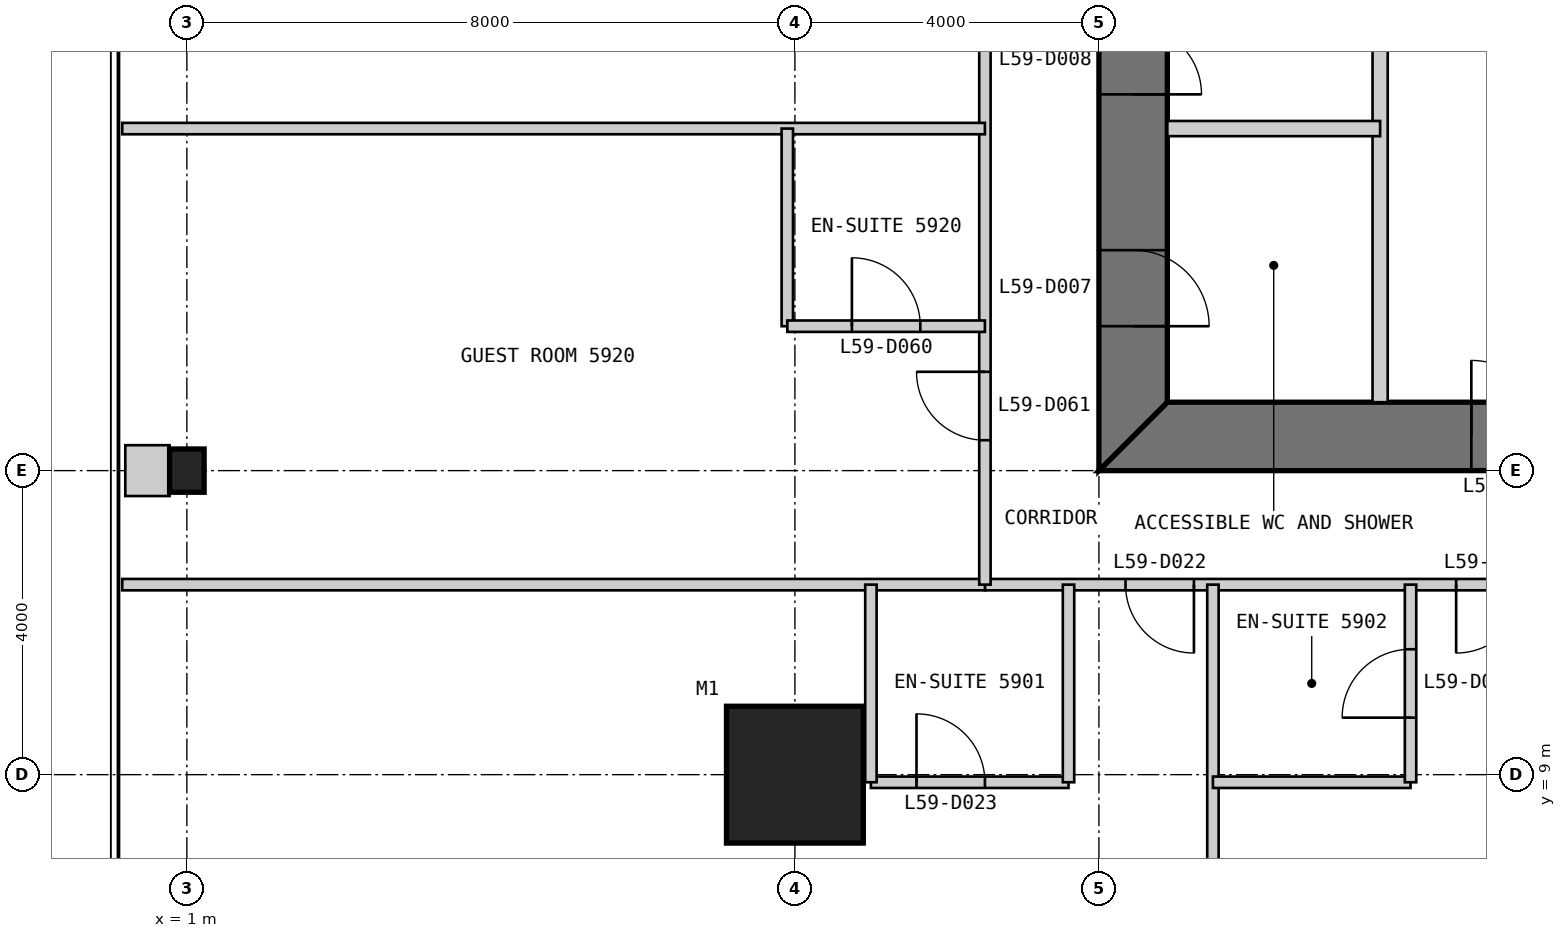
"""IFC4 building model, lengths in metres.
Left out: names, types, materials, properties, quantities, classifications, styles, units other than length and angle.
Written with IfcOpenShell. Run it as: python <this file> out.ifc"""

import sys

from ifc_helpers import new_model, si_unit, direction, frame, frame_2d, origin, origin_2d, place, context, subcontext, project, spatial, polyline, rectangle, i_section, outline, extrude, element, fill, save


model = new_model("IFC4")
c1 = context("Model", 3, precision=1e-05, world=origin(), true_north=direction((0.0, 1.0)))
c2 = subcontext(c1, "Body", "Model", "MODEL_VIEW")
j1 = project(units=[si_unit("LENGTHUNIT", "METRE"), si_unit("PLANEANGLEUNIT", "RADIAN")], contexts=[c1])
p1 = place(None, origin())
s1 = spatial("IfcSite", under=j1, at=p1, CompositionType="ELEMENT")
p2 = place(p1, origin())
s2 = spatial("IfcBuilding", under=s1, at=p2, CompositionType="ELEMENT")
p3 = place(p2, frame((0.0, 0.0, 252.6)))
s3 = spatial("IfcBuildingStorey", under=s2, at=p3, CompositionType="ELEMENT", Elevation=252.6)
p4 = place(p3, frame((9.0, 9.0, 0.0), z_axis=(0.0, 0.0, 1.0), x_axis=(1.0, 0.0, 0.0)))
e1 = element("IfcColumn", 1, at=p4, inside=s3, PredefinedType="COLUMN", context=c2, shape_type="SweptSolid", body=[
    extrude(rectangle(XDim=1.8, YDim=1.8, at=origin_2d()), origin(), (0.0, 0.0, 1.0), 3.4),
])
p5 = place(p3, frame((1.0, 13.0, 0.0), z_axis=(0.0, 0.0, 1.0), x_axis=(1.0, 0.0, 0.0)))
e2 = element("IfcColumn", 2, at=p5, inside=s3, PredefinedType="COLUMN", context=c2, shape_type="SweptSolid", body=[
    extrude(i_section(OverallWidth=0.455, OverallDepth=0.569, WebThickness=0.078, FlangeThickness=0.125, at=origin_2d()), origin(), (0.0, 0.0, 1.0), 3.4),
])
p6 = place(p3, frame((13.0, 13.45, 0.0), z_axis=(0.0, 0.0, 1.0), x_axis=(1.0, 0.0, 0.0)))
e3 = element("IfcWall", 3, at=p6, inside=s3, PredefinedType="SHEAR", context=c2, shape_type="SweptSolid", body=[
    extrude(outline(polyline([(0.0, -0.45), (24.0, -0.45), (23.1, 0.45), (0.9, 0.45), (0.0, -0.45)])), origin(), (0.0, 0.0, 1.0), 3.4),
])
p7 = place(p6, frame((4.9, 0.0, 0.0)))
e4 = element("IfcOpeningElement", 4, at=p7, cuts=e3, PredefinedType="OPENING", context=c2, shape_type="SweptSolid", body=[
    extrude(rectangle(XDim=1.0, YDim=2.2, at=frame_2d((0.5, 1.1))), frame((0.0, 0.46, 0.0), z_axis=(0.0, -1.0, 0.0), x_axis=(1.0, 0.0, 0.0)), (0.0, 0.0, 1.0), 0.92),
])
p8 = place(p6, frame((8.9, 0.0, 0.0)))
e5 = element("IfcOpeningElement", 5, at=p8, cuts=e3, PredefinedType="OPENING", context=c2, shape_type="SweptSolid", body=[
    extrude(rectangle(XDim=1.1, YDim=2.2, at=frame_2d((0.55, 1.1))), frame((0.0, 0.46, 0.0), z_axis=(0.0, -1.0, 0.0), x_axis=(1.0, 0.0, 0.0)), (0.0, 0.0, 1.0), 0.92),
])
p9 = place(p6, frame((15.05, 0.0, 0.0)))
e6 = element("IfcOpeningElement", 6, at=p9, cuts=e3, PredefinedType="OPENING", context=c2, shape_type="SweptSolid", body=[
    extrude(rectangle(XDim=0.9, YDim=2.2, at=frame_2d((0.45, 1.1))), frame((0.0, 0.46, 0.0), z_axis=(0.0, -1.0, 0.0), x_axis=(1.0, 0.0, 0.0)), (0.0, 0.0, 1.0), 0.92),
])
p10 = place(p6, frame((17.9, 0.0, 0.0)))
e7 = element("IfcOpeningElement", 7, at=p10, cuts=e3, PredefinedType="OPENING", context=c2, shape_type="SweptSolid", body=[
    extrude(rectangle(XDim=1.0, YDim=2.2, at=frame_2d((0.5, 1.1))), frame((0.0, 0.46, 0.0), z_axis=(0.0, -1.0, 0.0), x_axis=(1.0, 0.0, 0.0)), (0.0, 0.0, 1.0), 0.92),
])
p11 = place(p6, frame((21.4, 0.0, 0.0)))
e8 = element("IfcOpeningElement", 8, at=p11, cuts=e3, PredefinedType="OPENING", context=c2, shape_type="SweptSolid", body=[
    extrude(rectangle(XDim=1.0, YDim=2.2, at=frame_2d((0.5, 1.1))), frame((0.0, 0.46, 0.0), z_axis=(0.0, -1.0, 0.0), x_axis=(1.0, 0.0, 0.0)), (0.0, 0.0, 1.0), 0.92),
])
p12 = place(p3, frame((13.45, 36.1, 0.0), z_axis=(0.0, 0.0, 1.0), x_axis=(0.0, -1.0, 0.0)))
e9 = element("IfcWall", 9, at=p12, inside=s3, PredefinedType="SHEAR", context=c2, shape_type="SweptSolid", body=[
    extrude(outline(polyline([(-0.9, -0.45), (23.1, -0.45), (22.2, 0.45), (0.0, 0.45), (-0.9, -0.45)])), origin(), (0.0, 0.0, 1.0), 3.4),
])
p13 = place(p12, frame((20.2, 0.0, 0.0)))
e10 = element("IfcOpeningElement", 10, at=p13, cuts=e9, PredefinedType="OPENING", context=c2, shape_type="SweptSolid", body=[
    extrude(rectangle(XDim=1.0, YDim=2.2, at=frame_2d((0.5, 1.1))), frame((0.0, 0.46, 0.0), z_axis=(0.0, -1.0, 0.0), x_axis=(1.0, 0.0, 0.0)), (0.0, 0.0, 1.0), 0.92),
])
p14 = place(p12, frame((17.25, 0.0, 0.0)))
e11 = element("IfcOpeningElement", 11, at=p14, cuts=e9, PredefinedType="OPENING", context=c2, shape_type="SweptSolid", body=[
    extrude(rectangle(XDim=0.9, YDim=2.2, at=frame_2d((0.45, 1.1))), frame((0.0, 0.46, 0.0), z_axis=(0.0, -1.0, 0.0), x_axis=(1.0, 0.0, 0.0)), (0.0, 0.0, 1.0), 0.92),
])
p15 = place(p3, frame((16.7, 13.9, 0.0), z_axis=(0.0, 0.0, 1.0), x_axis=(0.0, 1.0, 0.0)))
e12 = element("IfcWall", 12, at=p15, inside=s3, PredefinedType="PARTITIONING", context=c2, shape_type="SweptSolid", body=[
    extrude(rectangle(XDim=16.1, YDim=0.2, at=frame_2d((8.05, 0.0))), origin(), (0.0, 0.0, 1.0), 3.2),
])
p16 = place(p15, frame((13.4, 0.0, 0.0)))
e13 = element("IfcOpeningElement", 13, at=p16, cuts=e12, PredefinedType="OPENING", context=c2, shape_type="SweptSolid", body=[
    extrude(rectangle(XDim=0.9, YDim=2.2, at=frame_2d((0.45, 1.1))), frame((0.0, 0.11, 0.0), z_axis=(0.0, -1.0, 0.0), x_axis=(1.0, 0.0, 0.0)), (0.0, 0.0, 1.0), 0.22),
])
p17 = place(p3, frame((13.9, 17.5, 0.0), z_axis=(0.0, 0.0, 1.0), x_axis=(1.0, 0.0, 0.0)))
e14 = element("IfcWall", 14, at=p17, inside=s3, PredefinedType="PARTITIONING", context=c2, shape_type="SweptSolid", body=[
    extrude(rectangle(XDim=2.8, YDim=0.2, at=frame_2d((1.4, 0.0))), origin(), (0.0, 0.0, 1.0), 3.2),
])
p18 = place(p3, frame((11.5, 11.5, 0.0), z_axis=(0.0, 0.0, 1.0), x_axis=(1.0, 0.0, 0.0)))
e15 = element("IfcWall", 15, at=p18, inside=s3, PredefinedType="PARTITIONING", context=c2, shape_type="SweptSolid", body=[
    extrude(rectangle(XDim=27.0, YDim=0.15, at=frame_2d((13.5, 0.0))), origin(), (0.0, 0.0, 1.0), 3.25),
])
p19 = place(p18, frame((1.85, 0.0, 0.0)))
e16 = element("IfcOpeningElement", 16, at=p19, cuts=e15, PredefinedType="OPENING", context=c2, shape_type="SweptSolid", body=[
    extrude(rectangle(XDim=0.9, YDim=2.1, at=frame_2d((0.45, 1.05))), frame((0.0, 0.085, 0.0), z_axis=(0.0, -1.0, 0.0), x_axis=(1.0, 0.0, 0.0)), (0.0, 0.0, 1.0), 0.17),
])
p20 = place(p18, frame((6.2, 0.0, 0.0)))
e17 = element("IfcOpeningElement", 17, at=p20, cuts=e15, PredefinedType="OPENING", context=c2, shape_type="SweptSolid", body=[
    extrude(rectangle(XDim=0.9, YDim=2.1, at=frame_2d((0.45, 1.05))), frame((0.0, 0.085, 0.0), z_axis=(0.0, -1.0, 0.0), x_axis=(1.0, 0.0, 0.0)), (0.0, 0.0, 1.0), 0.17),
])
p21 = place(p18, frame((12.2, 0.0, 0.0)))
e18 = element("IfcOpeningElement", 18, at=p21, cuts=e15, PredefinedType="OPENING", context=c2, shape_type="SweptSolid", body=[
    extrude(rectangle(XDim=0.9, YDim=2.1, at=frame_2d((0.45, 1.05))), frame((0.0, 0.085, 0.0), z_axis=(0.0, -1.0, 0.0), x_axis=(1.0, 0.0, 0.0)), (0.0, 0.0, 1.0), 0.17),
])
p22 = place(p18, frame((18.8, 0.0, 0.0)))
e19 = element("IfcOpeningElement", 19, at=p22, cuts=e15, PredefinedType="OPENING", context=c2, shape_type="SweptSolid", body=[
    extrude(rectangle(XDim=1.0, YDim=2.1, at=frame_2d((0.5, 1.05))), frame((0.0, 0.085, 0.0), z_axis=(0.0, -1.0, 0.0), x_axis=(1.0, 0.0, 0.0)), (0.0, 0.0, 1.0), 0.17),
])
p23 = place(p18, frame((24.2, 0.0, 0.0)))
e20 = element("IfcOpeningElement", 20, at=p23, cuts=e15, PredefinedType="OPENING", context=c2, shape_type="SweptSolid", body=[
    extrude(rectangle(XDim=0.9, YDim=2.1, at=frame_2d((0.45, 1.05))), frame((0.0, 0.085, 0.0), z_axis=(0.0, -1.0, 0.0), x_axis=(1.0, 0.0, 0.0)), (0.0, 0.0, 1.0), 0.17),
])
p24 = place(p3, frame((0.15, 11.5, 0.0), z_axis=(0.0, 0.0, 1.0), x_axis=(1.0, 0.0, 0.0)))
e21 = element("IfcWall", 21, at=p24, inside=s3, PredefinedType="PARTITIONING", context=c2, shape_type="SweptSolid", body=[
    extrude(rectangle(XDim=11.35, YDim=0.15, at=frame_2d((5.675, 0.0))), origin(), (0.0, 0.0, 1.0), 3.25),
])
p25 = place(p3, frame((10.0, 8.9, 0.0), z_axis=(0.0, 0.0, 1.0), x_axis=(1.0, 0.0, 0.0)))
e22 = element("IfcWall", 22, at=p25, inside=s3, PredefinedType="PARTITIONING", context=c2, shape_type="SweptSolid", body=[
    extrude(rectangle(XDim=2.6, YDim=0.15, at=frame_2d((1.3, 0.0))), origin(), (0.0, 0.0, 1.0), 2.638),
])
p26 = place(p25, frame((0.6, 0.0, 0.0)))
e23 = element("IfcOpeningElement", 23, at=p26, cuts=e22, PredefinedType="OPENING", context=c2, shape_type="SweptSolid", body=[
    extrude(rectangle(XDim=0.9, YDim=2.1, at=frame_2d((0.45, 1.05))), frame((0.0, 0.085, 0.0), z_axis=(0.0, -1.0, 0.0), x_axis=(1.0, 0.0, 0.0)), (0.0, 0.0, 1.0), 0.17),
])
for number, where, z_axis, x_axis in (
    (24, (10.0, 8.9, 0.0), (0.0, 0.0, 1.0), (0.0, 1.0, 0.0)),
    (25, (12.6, 8.9, 0.0), (0.0, 0.0, 1.0), (0.0, 1.0, 0.0)),
):
    element("IfcWall", number, at=place(p3, frame(where, z_axis=z_axis, x_axis=x_axis)), inside=s3, PredefinedType="PARTITIONING", context=c2, shape_type="SweptSolid", body=[
        extrude(rectangle(XDim=2.6, YDim=0.15, at=frame_2d((1.3, 0.0))), origin(), (0.0, 0.0, 1.0), 3.25),
    ])
p27 = place(p3, frame((14.5, 0.15, 0.0), z_axis=(0.0, 0.0, 1.0), x_axis=(0.0, 1.0, 0.0)))
e26 = element("IfcWall", 26, at=p27, inside=s3, PredefinedType="PARTITIONING", context=c2, shape_type="SweptSolid", body=[
    extrude(rectangle(XDim=11.35, YDim=0.15, at=frame_2d((5.675, 0.0))), origin(), (0.0, 0.0, 1.0), 3.25),
])
p28 = place(p3, frame((14.5, 8.9, 0.0), z_axis=(0.0, 0.0, 1.0), x_axis=(1.0, 0.0, 0.0)))
e27 = element("IfcWall", 27, at=p28, inside=s3, PredefinedType="PARTITIONING", context=c2, shape_type="SweptSolid", body=[
    extrude(rectangle(XDim=2.6, YDim=0.15, at=frame_2d((1.3, 0.0))), origin(), (0.0, 0.0, 1.0), 3.25),
])
p29 = place(p3, frame((17.1, 8.9, 0.0), z_axis=(0.0, 0.0, 1.0), x_axis=(0.0, 1.0, 0.0)))
e28 = element("IfcWall", 28, at=p29, inside=s3, PredefinedType="PARTITIONING", context=c2, shape_type="SweptSolid", body=[
    extrude(rectangle(XDim=2.6, YDim=0.15, at=frame_2d((1.3, 0.0))), origin(), (0.0, 0.0, 1.0), 3.25),
])
p30 = place(p29, frame((0.85, 0.0, 0.0)))
e29 = element("IfcOpeningElement", 29, at=p30, cuts=e28, PredefinedType="OPENING", context=c2, shape_type="SweptSolid", body=[
    extrude(rectangle(XDim=0.9, YDim=2.1, at=frame_2d((0.45, 1.05))), frame((0.0, 0.085, 0.0), z_axis=(0.0, -1.0, 0.0), x_axis=(1.0, 0.0, 0.0)), (0.0, 0.0, 1.0), 0.17),
])
p31 = place(p3, frame((11.5, 38.5, 0.0), z_axis=(0.0, 0.0, 1.0), x_axis=(0.0, -1.0, 0.0)))
e30 = element("IfcWall", 30, at=p31, inside=s3, PredefinedType="PARTITIONING", context=c2, shape_type="SweptSolid", body=[
    extrude(rectangle(XDim=27.0, YDim=0.15, at=frame_2d((13.5, 0.0))), origin(), (0.0, 0.0, 1.0), 3.25),
])
p32 = place(p31, frame((1.85, 0.0, 0.0)))
e31 = element("IfcOpeningElement", 31, at=p32, cuts=e30, PredefinedType="OPENING", context=c2, shape_type="SweptSolid", body=[
    extrude(rectangle(XDim=0.9, YDim=2.1, at=frame_2d((0.45, 1.05))), frame((0.0, 0.085, 0.0), z_axis=(0.0, -1.0, 0.0), x_axis=(1.0, 0.0, 0.0)), (0.0, 0.0, 1.0), 0.17),
])
p33 = place(p31, frame((6.2, 0.0, 0.0)))
e32 = element("IfcOpeningElement", 32, at=p33, cuts=e30, PredefinedType="OPENING", context=c2, shape_type="SweptSolid", body=[
    extrude(rectangle(XDim=0.9, YDim=2.1, at=frame_2d((0.45, 1.05))), frame((0.0, 0.085, 0.0), z_axis=(0.0, -1.0, 0.0), x_axis=(1.0, 0.0, 0.0)), (0.0, 0.0, 1.0), 0.17),
])
p34 = place(p31, frame((12.2, 0.0, 0.0)))
e33 = element("IfcOpeningElement", 33, at=p34, cuts=e30, PredefinedType="OPENING", context=c2, shape_type="SweptSolid", body=[
    extrude(rectangle(XDim=0.9, YDim=2.1, at=frame_2d((0.45, 1.05))), frame((0.0, 0.085, 0.0), z_axis=(0.0, -1.0, 0.0), x_axis=(1.0, 0.0, 0.0)), (0.0, 0.0, 1.0), 0.17),
])
p35 = place(p31, frame((18.2, 0.0, 0.0)))
e34 = element("IfcOpeningElement", 34, at=p35, cuts=e30, PredefinedType="OPENING", context=c2, shape_type="SweptSolid", body=[
    extrude(rectangle(XDim=0.9, YDim=2.1, at=frame_2d((0.45, 1.05))), frame((0.0, 0.085, 0.0), z_axis=(0.0, -1.0, 0.0), x_axis=(1.0, 0.0, 0.0)), (0.0, 0.0, 1.0), 0.17),
])
p36 = place(p31, frame((24.2, 0.0, 0.0)))
e35 = element("IfcOpeningElement", 35, at=p36, cuts=e30, PredefinedType="OPENING", context=c2, shape_type="SweptSolid", body=[
    extrude(rectangle(XDim=0.9, YDim=2.1, at=frame_2d((0.45, 1.05))), frame((0.0, 0.085, 0.0), z_axis=(0.0, -1.0, 0.0), x_axis=(1.0, 0.0, 0.0)), (0.0, 0.0, 1.0), 0.17),
])
p37 = place(p3, frame((0.15, 17.5, 0.0), z_axis=(0.0, 0.0, 1.0), x_axis=(1.0, 0.0, 0.0)))
e36 = element("IfcWall", 36, at=p37, inside=s3, PredefinedType="PARTITIONING", context=c2, shape_type="SweptSolid", body=[
    extrude(rectangle(XDim=11.35, YDim=0.15, at=frame_2d((5.675, 0.0))), origin(), (0.0, 0.0, 1.0), 3.25),
])
p38 = place(p3, frame((8.9, 17.5, 0.0), z_axis=(0.0, 0.0, 1.0), x_axis=(0.0, -1.0, 0.0)))
e37 = element("IfcWall", 37, at=p38, inside=s3, PredefinedType="PARTITIONING", context=c2, shape_type="SweptSolid", body=[
    extrude(rectangle(XDim=2.6, YDim=0.15, at=frame_2d((1.3, 0.0))), origin(), (0.0, 0.0, 1.0), 3.25),
])
p39 = place(p3, frame((8.9, 14.9, 0.0), z_axis=(0.0, 0.0, 1.0), x_axis=(1.0, 0.0, 0.0)))
e38 = element("IfcWall", 38, at=p39, inside=s3, PredefinedType="PARTITIONING", context=c2, shape_type="SweptSolid", body=[
    extrude(rectangle(XDim=2.6, YDim=0.15, at=frame_2d((1.3, 0.0))), origin(), (0.0, 0.0, 1.0), 3.25),
])
p40 = place(p39, frame((0.85, 0.0, 0.0)))
e39 = element("IfcOpeningElement", 39, at=p40, cuts=e38, PredefinedType="OPENING", context=c2, shape_type="SweptSolid", body=[
    extrude(rectangle(XDim=0.9, YDim=2.1, at=frame_2d((0.45, 1.05))), frame((0.0, 0.085, 0.0), z_axis=(0.0, -1.0, 0.0), x_axis=(1.0, 0.0, 0.0)), (0.0, 0.0, 1.0), 0.17),
])
p41 = place(p3, frame((0.19, 13.0, 0.0), z_axis=(0.0, 0.0, 1.0), x_axis=(1.0, 0.0, 0.0)))
e40 = element("IfcWall", 40, at=p41, inside=s3, PredefinedType="PARTITIONING", context=c2, shape_type="SweptSolid", body=[
    extrude(rectangle(XDim=0.583, YDim=0.669, at=frame_2d((0.292, 0.0))), origin(), (0.0, 0.0, 1.0), 3.25),
])
p42 = place(p7, origin())
e41 = element("IfcDoor", 41, at=p42, inside=s3, OperationType="SINGLE_SWING_LEFT", PredefinedType="DOOR", context=c2, shape_type="SweptSolid", body=[
    extrude(rectangle(XDim=1.0, YDim=2.2, at=frame_2d((0.5, 1.1))), frame((0.0, 0.025, 0.0), z_axis=(0.0, -1.0, 0.0), x_axis=(1.0, 0.0, 0.0)), (0.0, 0.0, 1.0), 0.05),
    extrude(outline(polyline([(0.0, 0.0), (0.04, 0.0), (0.04, 2.16), (0.96, 2.16), (0.96, 0.0), (1.0, 0.0), (1.0, 2.2), (0.0, 2.2), (0.0, 0.0)])), frame((0.0, 0.3, 0.0), z_axis=(0.0, -1.0, 0.0), x_axis=(1.0, 0.0, 0.0)), (0.0, 0.0, 1.0), 0.6),
])
fill(e4, e41)
p43 = place(p13, origin())
e42 = element("IfcDoor", 42, at=p43, inside=s3, OperationType="SINGLE_SWING_RIGHT", PredefinedType="DOOR", context=c2, shape_type="SweptSolid", body=[
    extrude(rectangle(XDim=1.0, YDim=2.2, at=frame_2d((0.5, 1.1))), frame((0.0, 0.025, 0.0), z_axis=(0.0, -1.0, 0.0), x_axis=(1.0, 0.0, 0.0)), (0.0, 0.0, 1.0), 0.05),
    extrude(outline(polyline([(0.0, 0.0), (0.04, 0.0), (0.04, 2.16), (0.96, 2.16), (0.96, 0.0), (1.0, 0.0), (1.0, 2.2), (0.0, 2.2), (0.0, 0.0)])), frame((0.0, 0.3, 0.0), z_axis=(0.0, -1.0, 0.0), x_axis=(1.0, 0.0, 0.0)), (0.0, 0.0, 1.0), 0.6),
])
fill(e10, e42)
p44 = place(p14, origin())
e43 = element("IfcDoor", 43, at=p44, inside=s3, OperationType="SINGLE_SWING_RIGHT", PredefinedType="DOOR", context=c2, shape_type="SweptSolid", body=[
    extrude(rectangle(XDim=0.9, YDim=2.2, at=frame_2d((0.45, 1.1))), frame((0.0, 0.025, 0.0), z_axis=(0.0, -1.0, 0.0), x_axis=(1.0, 0.0, 0.0)), (0.0, 0.0, 1.0), 0.05),
    extrude(outline(polyline([(0.0, 0.0), (0.04, 0.0), (0.04, 2.16), (0.86, 2.16), (0.86, 0.0), (0.9, 0.0), (0.9, 2.2), (0.0, 2.2), (0.0, 0.0)])), frame((0.0, 0.3, 0.0), z_axis=(0.0, -1.0, 0.0), x_axis=(1.0, 0.0, 0.0)), (0.0, 0.0, 1.0), 0.6),
])
fill(e11, e43)
p45 = place(p19, frame((0.9, 0.0, 0.0), z_axis=(0.0, 0.0, 1.0), x_axis=(-1.0, 0.0, 0.0)))
e44 = element("IfcDoor", 44, at=p45, inside=s3, OperationType="SINGLE_SWING_LEFT", PredefinedType="DOOR", context=c2, shape_type="SweptSolid", body=[
    extrude(rectangle(XDim=0.9, YDim=2.1, at=frame_2d((0.45, 1.05))), frame((0.0, 0.025, 0.0), z_axis=(0.0, -1.0, 0.0), x_axis=(1.0, 0.0, 0.0)), (0.0, 0.0, 1.0), 0.05),
])
fill(e16, e44)
p46 = place(p26, origin())
e45 = element("IfcDoor", 45, at=p46, inside=s3, OperationType="SINGLE_SWING_LEFT", PredefinedType="DOOR", context=c2, shape_type="SweptSolid", body=[
    extrude(rectangle(XDim=0.9, YDim=2.1, at=frame_2d((0.45, 1.05))), frame((0.0, 0.025, 0.0), z_axis=(0.0, -1.0, 0.0), x_axis=(1.0, 0.0, 0.0)), (0.0, 0.0, 1.0), 0.05),
])
fill(e23, e45)
p47 = place(p30, origin())
e46 = element("IfcDoor", 46, at=p47, inside=s3, OperationType="SINGLE_SWING_LEFT", PredefinedType="DOOR", context=c2, shape_type="SweptSolid", body=[
    extrude(rectangle(XDim=0.9, YDim=2.1, at=frame_2d((0.45, 1.05))), frame((0.0, 0.025, 0.0), z_axis=(0.0, -1.0, 0.0), x_axis=(1.0, 0.0, 0.0)), (0.0, 0.0, 1.0), 0.05),
])
fill(e29, e46)
p48 = place(p20, frame((0.9, 0.0, 0.0), z_axis=(0.0, 0.0, 1.0), x_axis=(-1.0, 0.0, 0.0)))
e47 = element("IfcDoor", 47, at=p48, inside=s3, OperationType="SINGLE_SWING_RIGHT", PredefinedType="DOOR", context=c2, shape_type="SweptSolid", body=[
    extrude(rectangle(XDim=0.9, YDim=2.1, at=frame_2d((0.45, 1.05))), frame((0.0, 0.025, 0.0), z_axis=(0.0, -1.0, 0.0), x_axis=(1.0, 0.0, 0.0)), (0.0, 0.0, 1.0), 0.05),
])
fill(e17, e47)
p49 = place(p40, origin())
e48 = element("IfcDoor", 48, at=p49, inside=s3, OperationType="SINGLE_SWING_LEFT", PredefinedType="DOOR", context=c2, shape_type="SweptSolid", body=[
    extrude(rectangle(XDim=0.9, YDim=2.1, at=frame_2d((0.45, 1.05))), frame((0.0, 0.025, 0.0), z_axis=(0.0, -1.0, 0.0), x_axis=(1.0, 0.0, 0.0)), (0.0, 0.0, 1.0), 0.05),
])
fill(e39, e48)
p50 = place(p36, frame((0.9, 0.0, 0.0), z_axis=(0.0, 0.0, 1.0), x_axis=(-1.0, 0.0, 0.0)))
e49 = element("IfcDoor", 49, at=p50, inside=s3, OperationType="SINGLE_SWING_RIGHT", PredefinedType="DOOR", context=c2, shape_type="SweptSolid", body=[
    extrude(rectangle(XDim=0.9, YDim=2.1, at=frame_2d((0.45, 1.05))), frame((0.0, 0.025, 0.0), z_axis=(0.0, -1.0, 0.0), x_axis=(1.0, 0.0, 0.0)), (0.0, 0.0, 1.0), 0.05),
])
fill(e35, e49)
save(model, sys.argv[1])
